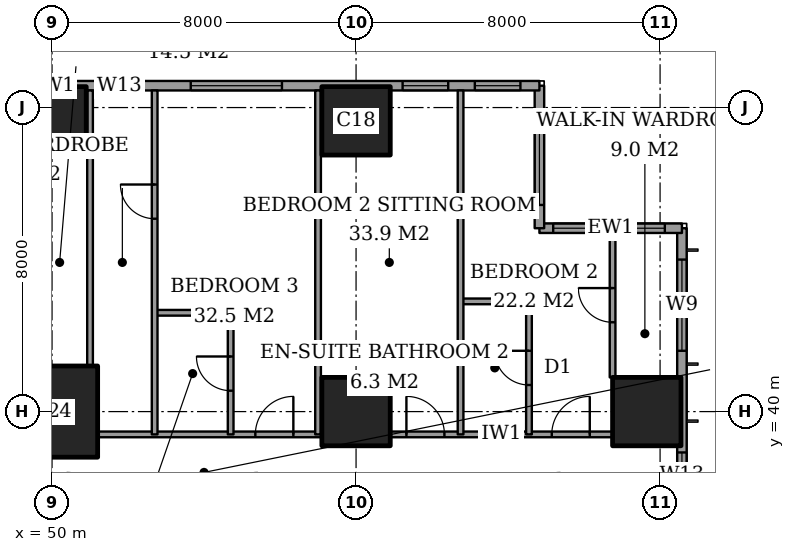
"""IFC4 building model, lengths in metres.
Left out: names, types, materials, properties, quantities, classifications, styles, units other than length and angle.
Written with IfcOpenShell. Run it as: python <this file> out.ifc"""

import sys

from ifc_helpers import new_model, si_unit, direction, frame, frame_2d, origin, origin_2d, place, context, subcontext, project, spatial, rectangle, extrude, element, fill, save


model = new_model("IFC4")
c1 = context("Model", 3, precision=1e-05, world=origin(), true_north=direction((0.0, 1.0)))
c2 = subcontext(c1, "Body", "Model", "MODEL_VIEW")
j1 = project(units=[si_unit("LENGTHUNIT", "METRE"), si_unit("PLANEANGLEUNIT", "RADIAN")], contexts=[c1])
p1 = place(None, origin())
s1 = spatial("IfcSite", under=j1, at=p1, CompositionType="ELEMENT")
p2 = place(p1, origin())
s2 = spatial("IfcBuilding", under=s1, at=p2, CompositionType="ELEMENT")
p3 = place(p2, frame((0.0, 0.0, 196.6)))
s3 = spatial("IfcBuildingStorey", under=s2, at=p3, CompositionType="ELEMENT", Elevation=196.6)
p4 = place(p3, frame((50.0, 40.0, 0.0), z_axis=(0.0, 0.0, 1.0), x_axis=(1.0, 0.0, 0.0)))
e1 = element("IfcColumn", 1, at=p4, inside=s3, PredefinedType="COLUMN", context=c2, shape_type="SweptSolid", body=[
    extrude(rectangle(XDim=2.4, YDim=2.4, at=origin_2d()), origin(), (0.0, 0.0, 1.0), 3.6),
])
for number, where, z_axis, x_axis in (
    (2, (50.0, 47.65, 0.0), (0.0, 0.0, 1.0), (1.0, 0.0, 0.0)),
    (3, (58.0, 40.0, 0.0), (0.0, 0.0, 1.0), (1.0, 0.0, 0.0)),
    (4, (58.0, 47.65, 0.0), (0.0, 0.0, 1.0), (1.0, 0.0, 0.0)),
    (5, (65.65, 40.0, 0.0), (0.0, 0.0, 1.0), (1.0, 0.0, 0.0)),
):
    element("IfcColumn", number, at=place(p3, frame(where, z_axis=z_axis, x_axis=x_axis)), inside=s3, PredefinedType="COLUMN", context=c2, shape_type="SweptSolid", body=[
        extrude(rectangle(XDim=1.8, YDim=1.8, at=origin_2d()), origin(), (0.0, 0.0, 1.0), 3.6),
    ])
p5 = place(p3, frame((66.575, 3.175, 0.0), z_axis=(0.0, 0.0, 1.0), x_axis=(0.0, 1.0, 0.0)))
e6 = element("IfcWall", 6, at=p5, inside=s3, PredefinedType="SOLIDWALL", context=c2, shape_type="SweptSolid", body=[
    extrude(rectangle(XDim=41.65, YDim=0.25, at=frame_2d((20.825, 0.0))), origin(), (0.0, 0.0, 1.0), 3.6),
])
p6 = place(p5, frame((0.825, 0.0, 0.2)))
e7 = element("IfcOpeningElement", 7, at=p6, cuts=e6, PredefinedType="OPENING", context=c2, shape_type="SweptSolid", body=[
    extrude(rectangle(XDim=2.4, YDim=2.4, at=frame_2d((1.2, 1.2))), frame((0.0, 0.135, 0.0), z_axis=(0.0, -1.0, 0.0), x_axis=(1.0, 0.0, 0.0)), (0.0, 0.0, 1.0), 0.27),
])
p7 = place(p5, frame((6.05, 0.0, 0.2)))
e8 = element("IfcOpeningElement", 8, at=p7, cuts=e6, PredefinedType="OPENING", context=c2, shape_type="SweptSolid", body=[
    extrude(rectangle(XDim=1.2, YDim=2.4, at=frame_2d((0.6, 1.2))), frame((0.0, 0.135, 0.0), z_axis=(0.0, -1.0, 0.0), x_axis=(1.0, 0.0, 0.0)), (0.0, 0.0, 1.0), 0.27),
])
p8 = place(p5, frame((8.475, 0.0, 0.2)))
e9 = element("IfcOpeningElement", 9, at=p8, cuts=e6, PredefinedType="OPENING", context=c2, shape_type="SweptSolid", body=[
    extrude(rectangle(XDim=2.4, YDim=2.4, at=frame_2d((1.2, 1.2))), frame((0.0, 0.135, 0.0), z_axis=(0.0, -1.0, 0.0), x_axis=(1.0, 0.0, 0.0)), (0.0, 0.0, 1.0), 0.27),
])
p9 = place(p5, frame((15.675, 0.0, 0.2)))
e10 = element("IfcOpeningElement", 10, at=p9, cuts=e6, PredefinedType="OPENING", context=c2, shape_type="SweptSolid", body=[
    extrude(rectangle(XDim=2.4, YDim=2.4, at=frame_2d((1.2, 1.2))), frame((0.0, 0.135, 0.0), z_axis=(0.0, -1.0, 0.0), x_axis=(1.0, 0.0, 0.0)), (0.0, 0.0, 1.0), 0.27),
])
p10 = place(p5, frame((23.625, 0.0, 0.2)))
e11 = element("IfcOpeningElement", 11, at=p10, cuts=e6, PredefinedType="OPENING", context=c2, shape_type="SweptSolid", body=[
    extrude(rectangle(XDim=2.4, YDim=2.4, at=frame_2d((1.2, 1.2))), frame((0.0, 0.135, 0.0), z_axis=(0.0, -1.0, 0.0), x_axis=(1.0, 0.0, 0.0)), (0.0, 0.0, 1.0), 0.27),
])
p11 = place(p5, frame((30.775, 0.0, 0.2)))
e12 = element("IfcOpeningElement", 12, at=p11, cuts=e6, PredefinedType="OPENING", context=c2, shape_type="SweptSolid", body=[
    extrude(rectangle(XDim=2.4, YDim=2.4, at=frame_2d((1.2, 1.2))), frame((0.0, 0.135, 0.0), z_axis=(0.0, -1.0, 0.0), x_axis=(1.0, 0.0, 0.0)), (0.0, 0.0, 1.0), 0.27),
])
p12 = place(p5, frame((34.55, 0.0, 0.2)))
e13 = element("IfcOpeningElement", 13, at=p12, cuts=e6, PredefinedType="OPENING", context=c2, shape_type="SweptSolid", body=[
    extrude(rectangle(XDim=1.2, YDim=2.4, at=frame_2d((0.6, 1.2))), frame((0.0, 0.135, 0.0), z_axis=(0.0, -1.0, 0.0), x_axis=(1.0, 0.0, 0.0)), (0.0, 0.0, 1.0), 0.27),
])
p13 = place(p5, frame((38.425, 0.0, 0.2)))
e14 = element("IfcOpeningElement", 14, at=p13, cuts=e6, PredefinedType="OPENING", context=c2, shape_type="SweptSolid", body=[
    extrude(rectangle(XDim=2.4, YDim=2.4, at=frame_2d((1.2, 1.2))), frame((0.0, 0.135, 0.0), z_axis=(0.0, -1.0, 0.0), x_axis=(1.0, 0.0, 0.0)), (0.0, 0.0, 1.0), 0.27),
])
p14 = place(p3, frame((66.575, 44.825, 0.0), z_axis=(0.0, 0.0, 1.0), x_axis=(-1.0, 0.0, 0.0)))
e15 = element("IfcWall", 15, at=p14, inside=s3, PredefinedType="SOLIDWALL", context=c2, shape_type="SweptSolid", body=[
    extrude(rectangle(XDim=3.75, YDim=0.25, at=frame_2d((1.875, 0.0))), origin(), (0.0, 0.0, 1.0), 3.6),
])
p15 = place(p14, frame((0.45, 0.0, 0.2)))
e16 = element("IfcOpeningElement", 16, at=p15, cuts=e15, PredefinedType="OPENING", context=c2, shape_type="SweptSolid", body=[
    extrude(rectangle(XDim=1.2, YDim=2.4, at=frame_2d((0.6, 1.2))), frame((0.0, 0.135, 0.0), z_axis=(0.0, -1.0, 0.0), x_axis=(1.0, 0.0, 0.0)), (0.0, 0.0, 1.0), 0.27),
])
p16 = place(p14, frame((2.188, 0.0, 0.2)))
e17 = element("IfcOpeningElement", 17, at=p16, cuts=e15, PredefinedType="OPENING", context=c2, shape_type="SweptSolid", body=[
    extrude(rectangle(XDim=1.2, YDim=2.4, at=frame_2d((0.6, 1.2))), frame((0.0, 0.135, 0.0), z_axis=(0.0, -1.0, 0.0), x_axis=(1.0, 0.0, 0.0)), (0.0, 0.0, 1.0), 0.27),
])
p17 = place(p3, frame((62.825, 44.825, 0.0), z_axis=(0.0, 0.0, 1.0), x_axis=(0.0, 1.0, 0.0)))
e18 = element("IfcWall", 18, at=p17, inside=s3, PredefinedType="SOLIDWALL", context=c2, shape_type="SweptSolid", body=[
    extrude(rectangle(XDim=3.75, YDim=0.25, at=frame_2d((1.875, 0.0))), origin(), (0.0, 0.0, 1.0), 3.6),
])
p18 = place(p17, frame((0.613, 0.0, 0.2)))
e19 = element("IfcOpeningElement", 19, at=p18, cuts=e18, PredefinedType="OPENING", context=c2, shape_type="SweptSolid", body=[
    extrude(rectangle(XDim=2.4, YDim=2.4, at=frame_2d((1.2, 1.2))), frame((0.0, 0.135, 0.0), z_axis=(0.0, -1.0, 0.0), x_axis=(1.0, 0.0, 0.0)), (0.0, 0.0, 1.0), 0.27),
])
p19 = place(p3, frame((62.825, 48.575, 0.0), z_axis=(0.0, 0.0, 1.0), x_axis=(-1.0, 0.0, 0.0)))
e20 = element("IfcWall", 20, at=p19, inside=s3, PredefinedType="SOLIDWALL", context=c2, shape_type="SweptSolid", body=[
    extrude(rectangle(XDim=21.4, YDim=0.25, at=frame_2d((10.7, 0.0))), origin(), (0.0, 0.0, 1.0), 3.6),
])
p20 = place(p19, frame((0.5, 0.0, 0.2)))
e21 = element("IfcOpeningElement", 21, at=p20, cuts=e20, PredefinedType="OPENING", context=c2, shape_type="SweptSolid", body=[
    extrude(rectangle(XDim=1.2, YDim=2.4, at=frame_2d((0.6, 1.2))), frame((0.0, 0.135, 0.0), z_axis=(0.0, -1.0, 0.0), x_axis=(1.0, 0.0, 0.0)), (0.0, 0.0, 1.0), 0.27),
])
p21 = place(p19, frame((2.4, 0.0, 0.2)))
e22 = element("IfcOpeningElement", 22, at=p21, cuts=e20, PredefinedType="OPENING", context=c2, shape_type="SweptSolid", body=[
    extrude(rectangle(XDim=1.2, YDim=2.4, at=frame_2d((0.6, 1.2))), frame((0.0, 0.135, 0.0), z_axis=(0.0, -1.0, 0.0), x_axis=(1.0, 0.0, 0.0)), (0.0, 0.0, 1.0), 0.27),
])
p22 = place(p19, frame((6.775, 0.0, 0.2)))
e23 = element("IfcOpeningElement", 23, at=p22, cuts=e20, PredefinedType="OPENING", context=c2, shape_type="SweptSolid", body=[
    extrude(rectangle(XDim=2.4, YDim=2.4, at=frame_2d((1.2, 1.2))), frame((0.0, 0.135, 0.0), z_axis=(0.0, -1.0, 0.0), x_axis=(1.0, 0.0, 0.0)), (0.0, 0.0, 1.0), 0.27),
])
p23 = place(p19, frame((10.45, 0.0, 0.2)))
e24 = element("IfcOpeningElement", 24, at=p23, cuts=e20, PredefinedType="OPENING", context=c2, shape_type="SweptSolid", body=[
    extrude(rectangle(XDim=1.2, YDim=2.4, at=frame_2d((0.6, 1.2))), frame((0.0, 0.135, 0.0), z_axis=(0.0, -1.0, 0.0), x_axis=(1.0, 0.0, 0.0)), (0.0, 0.0, 1.0), 0.27),
])
p24 = place(p19, frame((14.425, 0.0, 0.2)))
e25 = element("IfcOpeningElement", 25, at=p24, cuts=e20, PredefinedType="OPENING", context=c2, shape_type="SweptSolid", body=[
    extrude(rectangle(XDim=2.4, YDim=2.4, at=frame_2d((1.2, 1.2))), frame((0.0, 0.135, 0.0), z_axis=(0.0, -1.0, 0.0), x_axis=(1.0, 0.0, 0.0)), (0.0, 0.0, 1.0), 0.27),
])
p25 = place(p19, frame((17.9, 0.0, 0.2)))
e26 = element("IfcOpeningElement", 26, at=p25, cuts=e20, PredefinedType="OPENING", context=c2, shape_type="SweptSolid", body=[
    extrude(rectangle(XDim=1.2, YDim=2.4, at=frame_2d((0.6, 1.2))), frame((0.0, 0.135, 0.0), z_axis=(0.0, -1.0, 0.0), x_axis=(1.0, 0.0, 0.0)), (0.0, 0.0, 1.0), 0.27),
])
p26 = place(p3, frame((51.2, 39.4, 0.0), z_axis=(0.0, 0.0, 1.0), x_axis=(1.0, 0.0, 0.0)))
e27 = element("IfcWall", 27, at=p26, inside=s3, PredefinedType="PARTITIONING", context=c2, shape_type="SweptSolid", body=[
    extrude(rectangle(XDim=5.9, YDim=0.15, at=frame_2d((2.95, 0.0))), origin(), (0.0, 0.0, 1.0), 3.35),
])
p27 = place(p26, frame((4.15, 0.0, 0.0)))
e28 = element("IfcOpeningElement", 28, at=p27, cuts=e27, PredefinedType="OPENING", context=c2, shape_type="SweptSolid", body=[
    extrude(rectangle(XDim=1.0, YDim=2.1, at=frame_2d((0.5, 1.05))), frame((0.0, 0.085, 0.0), z_axis=(0.0, -1.0, 0.0), x_axis=(1.0, 0.0, 0.0)), (0.0, 0.0, 1.0), 0.17),
])
p28 = place(p3, frame((58.9, 39.4, 0.0), z_axis=(0.0, 0.0, 1.0), x_axis=(1.0, 0.0, 0.0)))
e29 = element("IfcWall", 29, at=p28, inside=s3, PredefinedType="PARTITIONING", context=c2, shape_type="SweptSolid", body=[
    extrude(rectangle(XDim=5.85, YDim=0.15, at=frame_2d((2.925, 0.0))), origin(), (0.0, 0.0, 1.0), 3.35),
])
p29 = place(p28, frame((4.25, 0.0, 0.0)))
e30 = element("IfcOpeningElement", 30, at=p29, cuts=e29, PredefinedType="OPENING", context=c2, shape_type="SweptSolid", body=[
    extrude(rectangle(XDim=1.0, YDim=2.1, at=frame_2d((0.5, 1.05))), frame((0.0, 0.085, 0.0), z_axis=(0.0, -1.0, 0.0), x_axis=(1.0, 0.0, 0.0)), (0.0, 0.0, 1.0), 0.17),
])
p30 = place(p28, frame((0.425, 0.0, 0.0)))
e31 = element("IfcOpeningElement", 31, at=p30, cuts=e29, PredefinedType="OPENING", context=c2, shape_type="SweptSolid", body=[
    extrude(rectangle(XDim=1.0, YDim=2.1, at=frame_2d((0.5, 1.05))), frame((0.0, 0.085, 0.0), z_axis=(0.0, -1.0, 0.0), x_axis=(1.0, 0.0, 0.0)), (0.0, 0.0, 1.0), 0.17),
])
p31 = place(p3, frame((52.7, 42.6, 0.0), z_axis=(0.0, 0.0, 1.0), x_axis=(1.0, 0.0, 0.0)))
e32 = element("IfcWall", 32, at=p31, inside=s3, PredefinedType="PARTITIONING", context=c2, shape_type="SweptSolid", body=[
    extrude(rectangle(XDim=2.0, YDim=0.15, at=frame_2d((1.0, 0.0))), origin(), (0.0, 0.0, 1.0), 3.35),
])
p32 = place(p3, frame((60.75, 42.9, 0.0), z_axis=(0.0, 0.0, 1.0), x_axis=(1.0, 0.0, 0.0)))
e33 = element("IfcWall", 33, at=p32, inside=s3, PredefinedType="PARTITIONING", context=c2, shape_type="SweptSolid", body=[
    extrude(rectangle(XDim=1.8, YDim=0.15, at=frame_2d((0.9, 0.0))), origin(), (0.0, 0.0, 1.0), 3.35),
])
p33 = place(p3, frame((51.0, 41.2, 0.0), z_axis=(0.0, 0.0, 1.0), x_axis=(0.0, 1.0, 0.0)))
e34 = element("IfcWall", 34, at=p33, inside=s3, PredefinedType="PARTITIONING", context=c2, shape_type="SweptSolid", body=[
    extrude(rectangle(XDim=7.25, YDim=0.15, at=frame_2d((3.625, 0.0))), origin(), (0.0, 0.0, 1.0), 3.35),
])
p34 = place(p3, frame((52.7, 39.4, 0.0), z_axis=(0.0, 0.0, 1.0), x_axis=(0.0, 1.0, 0.0)))
e35 = element("IfcWall", 35, at=p34, inside=s3, PredefinedType="PARTITIONING", context=c2, shape_type="SweptSolid", body=[
    extrude(rectangle(XDim=9.05, YDim=0.15, at=frame_2d((4.525, 0.0))), origin(), (0.0, 0.0, 1.0), 3.35),
])
p35 = place(p34, frame((5.675, 0.0, 0.0)))
e36 = element("IfcOpeningElement", 36, at=p35, cuts=e35, PredefinedType="OPENING", context=c2, shape_type="SweptSolid", body=[
    extrude(rectangle(XDim=0.9, YDim=2.1, at=frame_2d((0.45, 1.05))), frame((0.0, 0.085, 0.0), z_axis=(0.0, -1.0, 0.0), x_axis=(1.0, 0.0, 0.0)), (0.0, 0.0, 1.0), 0.17),
])
p36 = place(p3, frame((54.7, 39.4, 0.0), z_axis=(0.0, 0.0, 1.0), x_axis=(0.0, 1.0, 0.0)))
e37 = element("IfcWall", 37, at=p36, inside=s3, PredefinedType="PARTITIONING", context=c2, shape_type="SweptSolid", body=[
    extrude(rectangle(XDim=3.2, YDim=0.15, at=frame_2d((1.6, 0.0))), origin(), (0.0, 0.0, 1.0), 3.35),
])
p37 = place(p36, frame((1.15, 0.0, 0.0)))
e38 = element("IfcOpeningElement", 38, at=p37, cuts=e37, PredefinedType="OPENING", context=c2, shape_type="SweptSolid", body=[
    extrude(rectangle(XDim=0.9, YDim=2.1, at=frame_2d((0.45, 1.05))), frame((0.0, 0.085, 0.0), z_axis=(0.0, -1.0, 0.0), x_axis=(1.0, 0.0, 0.0)), (0.0, 0.0, 1.0), 0.17),
])
for number, where, z_axis, x_axis in (
    (39, (57.0, 39.4, 0.0), (0.0, 0.0, 1.0), (0.0, 1.0, 0.0)),
    (40, (60.75, 39.4, 0.0), (0.0, 0.0, 1.0), (0.0, 1.0, 0.0)),
):
    element("IfcWall", number, at=place(p3, frame(where, z_axis=z_axis, x_axis=x_axis)), inside=s3, PredefinedType="PARTITIONING", context=c2, shape_type="SweptSolid", body=[
        extrude(rectangle(XDim=9.05, YDim=0.15, at=frame_2d((4.525, 0.0))), origin(), (0.0, 0.0, 1.0), 3.35),
    ])
p38 = place(p3, frame((62.55, 39.4, 0.0), z_axis=(0.0, 0.0, 1.0), x_axis=(0.0, 1.0, 0.0)))
e41 = element("IfcWall", 41, at=p38, inside=s3, PredefinedType="PARTITIONING", context=c2, shape_type="SweptSolid", body=[
    extrude(rectangle(XDim=3.5, YDim=0.15, at=frame_2d((1.75, 0.0))), origin(), (0.0, 0.0, 1.0), 3.35),
])
p39 = place(p38, frame((1.3, 0.0, 0.0)))
e42 = element("IfcOpeningElement", 42, at=p39, cuts=e41, PredefinedType="OPENING", context=c2, shape_type="SweptSolid", body=[
    extrude(rectangle(XDim=0.9, YDim=2.1, at=frame_2d((0.45, 1.05))), frame((0.0, 0.085, 0.0), z_axis=(0.0, -1.0, 0.0), x_axis=(1.0, 0.0, 0.0)), (0.0, 0.0, 1.0), 0.17),
])
p40 = place(p3, frame((64.75, 40.9, 0.0), z_axis=(0.0, 0.0, 1.0), x_axis=(0.0, 1.0, 0.0)))
e43 = element("IfcWall", 43, at=p40, inside=s3, PredefinedType="PARTITIONING", context=c2, shape_type="SweptSolid", body=[
    extrude(rectangle(XDim=3.8, YDim=0.15, at=frame_2d((1.9, 0.0))), origin(), (0.0, 0.0, 1.0), 3.35),
])
p41 = place(p40, frame((1.45, 0.0, 0.0)))
e44 = element("IfcOpeningElement", 44, at=p41, cuts=e43, PredefinedType="OPENING", context=c2, shape_type="SweptSolid", body=[
    extrude(rectangle(XDim=0.9, YDim=2.1, at=frame_2d((0.45, 1.05))), frame((0.0, 0.085, 0.0), z_axis=(0.0, -1.0, 0.0), x_axis=(1.0, 0.0, 0.0)), (0.0, 0.0, 1.0), 0.17),
])
p42 = place(p12, origin())
e45 = element("IfcWindow", 45, at=p42, inside=s3, PartitioningType="SINGLE_PANEL", PredefinedType="WINDOW", context=c2, shape_type="SweptSolid", body=[
    extrude(rectangle(XDim=1.2, YDim=2.4, at=frame_2d((0.6, 1.2))), frame((0.0, 0.03, 0.0), z_axis=(0.0, -1.0, 0.0), x_axis=(1.0, 0.0, 0.0)), (0.0, 0.0, 1.0), 0.06),
])
fill(e13, e45)
p43 = place(p13, origin())
e46 = element("IfcWindow", 46, at=p43, inside=s3, PartitioningType="SINGLE_PANEL", PredefinedType="WINDOW", context=c2, shape_type="SweptSolid", body=[
    extrude(rectangle(XDim=2.4, YDim=2.4, at=frame_2d((1.2, 1.2))), frame((0.0, 0.03, 0.0), z_axis=(0.0, -1.0, 0.0), x_axis=(1.0, 0.0, 0.0)), (0.0, 0.0, 1.0), 0.06),
])
fill(e14, e46)
p44 = place(p15, origin())
e47 = element("IfcWindow", 47, at=p44, inside=s3, PartitioningType="SINGLE_PANEL", PredefinedType="WINDOW", context=c2, shape_type="SweptSolid", body=[
    extrude(rectangle(XDim=1.2, YDim=2.4, at=frame_2d((0.6, 1.2))), frame((0.0, 0.03, 0.0), z_axis=(0.0, -1.0, 0.0), x_axis=(1.0, 0.0, 0.0)), (0.0, 0.0, 1.0), 0.06),
])
fill(e16, e47)
p45 = place(p16, origin())
e48 = element("IfcWindow", 48, at=p45, inside=s3, PartitioningType="SINGLE_PANEL", PredefinedType="WINDOW", context=c2, shape_type="SweptSolid", body=[
    extrude(rectangle(XDim=1.2, YDim=2.4, at=frame_2d((0.6, 1.2))), frame((0.0, 0.03, 0.0), z_axis=(0.0, -1.0, 0.0), x_axis=(1.0, 0.0, 0.0)), (0.0, 0.0, 1.0), 0.06),
])
fill(e17, e48)
p46 = place(p18, origin())
e49 = element("IfcWindow", 49, at=p46, inside=s3, PartitioningType="SINGLE_PANEL", PredefinedType="WINDOW", context=c2, shape_type="SweptSolid", body=[
    extrude(rectangle(XDim=2.4, YDim=2.4, at=frame_2d((1.2, 1.2))), frame((0.0, 0.03, 0.0), z_axis=(0.0, -1.0, 0.0), x_axis=(1.0, 0.0, 0.0)), (0.0, 0.0, 1.0), 0.06),
])
fill(e19, e49)
p47 = place(p20, origin())
e50 = element("IfcWindow", 50, at=p47, inside=s3, PartitioningType="SINGLE_PANEL", PredefinedType="WINDOW", context=c2, shape_type="SweptSolid", body=[
    extrude(rectangle(XDim=1.2, YDim=2.4, at=frame_2d((0.6, 1.2))), frame((0.0, 0.03, 0.0), z_axis=(0.0, -1.0, 0.0), x_axis=(1.0, 0.0, 0.0)), (0.0, 0.0, 1.0), 0.06),
])
fill(e21, e50)
p48 = place(p21, origin())
e51 = element("IfcWindow", 51, at=p48, inside=s3, PartitioningType="SINGLE_PANEL", PredefinedType="WINDOW", context=c2, shape_type="SweptSolid", body=[
    extrude(rectangle(XDim=1.2, YDim=2.4, at=frame_2d((0.6, 1.2))), frame((0.0, 0.03, 0.0), z_axis=(0.0, -1.0, 0.0), x_axis=(1.0, 0.0, 0.0)), (0.0, 0.0, 1.0), 0.06),
])
fill(e22, e51)
p49 = place(p22, origin())
e52 = element("IfcWindow", 52, at=p49, inside=s3, PartitioningType="SINGLE_PANEL", PredefinedType="WINDOW", context=c2, shape_type="SweptSolid", body=[
    extrude(rectangle(XDim=2.4, YDim=2.4, at=frame_2d((1.2, 1.2))), frame((0.0, 0.03, 0.0), z_axis=(0.0, -1.0, 0.0), x_axis=(1.0, 0.0, 0.0)), (0.0, 0.0, 1.0), 0.06),
])
fill(e23, e52)
p50 = place(p23, origin())
e53 = element("IfcWindow", 53, at=p50, inside=s3, PartitioningType="SINGLE_PANEL", PredefinedType="WINDOW", context=c2, shape_type="SweptSolid", body=[
    extrude(rectangle(XDim=1.2, YDim=2.4, at=frame_2d((0.6, 1.2))), frame((0.0, 0.03, 0.0), z_axis=(0.0, -1.0, 0.0), x_axis=(1.0, 0.0, 0.0)), (0.0, 0.0, 1.0), 0.06),
])
fill(e24, e53)
p51 = place(p41, origin())
e54 = element("IfcDoor", 54, at=p51, inside=s3, OperationType="SINGLE_SWING_LEFT", PredefinedType="DOOR", context=c2, shape_type="SweptSolid", body=[
    extrude(rectangle(XDim=0.9, YDim=2.1, at=frame_2d((0.45, 1.05))), frame((0.0, 0.025, 0.0), z_axis=(0.0, -1.0, 0.0), x_axis=(1.0, 0.0, 0.0)), (0.0, 0.0, 1.0), 0.05),
])
fill(e44, e54)
p52 = place(p39, origin())
e55 = element("IfcDoor", 55, at=p52, inside=s3, OperationType="SINGLE_SWING_LEFT", PredefinedType="DOOR", context=c2, shape_type="SweptSolid", body=[
    extrude(rectangle(XDim=0.9, YDim=2.1, at=frame_2d((0.45, 1.05))), frame((0.0, 0.025, 0.0), z_axis=(0.0, -1.0, 0.0), x_axis=(1.0, 0.0, 0.0)), (0.0, 0.0, 1.0), 0.05),
])
fill(e42, e55)
p53 = place(p29, origin())
e56 = element("IfcDoor", 56, at=p53, inside=s3, OperationType="SINGLE_SWING_LEFT", PredefinedType="DOOR", context=c2, shape_type="SweptSolid", body=[
    extrude(rectangle(XDim=1.0, YDim=2.1, at=frame_2d((0.5, 1.05))), frame((0.0, 0.025, 0.0), z_axis=(0.0, -1.0, 0.0), x_axis=(1.0, 0.0, 0.0)), (0.0, 0.0, 1.0), 0.05),
])
fill(e30, e56)
p54 = place(p30, origin())
e57 = element("IfcDoor", 57, at=p54, inside=s3, OperationType="SINGLE_SWING_RIGHT", PredefinedType="DOOR", context=c2, shape_type="SweptSolid", body=[
    extrude(rectangle(XDim=1.0, YDim=2.1, at=frame_2d((0.5, 1.05))), frame((0.0, 0.025, 0.0), z_axis=(0.0, -1.0, 0.0), x_axis=(1.0, 0.0, 0.0)), (0.0, 0.0, 1.0), 0.05),
])
fill(e31, e57)
p55 = place(p37, origin())
e58 = element("IfcDoor", 58, at=p55, inside=s3, OperationType="SINGLE_SWING_LEFT", PredefinedType="DOOR", context=c2, shape_type="SweptSolid", body=[
    extrude(rectangle(XDim=0.9, YDim=2.1, at=frame_2d((0.45, 1.05))), frame((0.0, 0.025, 0.0), z_axis=(0.0, -1.0, 0.0), x_axis=(1.0, 0.0, 0.0)), (0.0, 0.0, 1.0), 0.05),
])
fill(e38, e58)
p56 = place(p27, origin())
e59 = element("IfcDoor", 59, at=p56, inside=s3, OperationType="SINGLE_SWING_LEFT", PredefinedType="DOOR", context=c2, shape_type="SweptSolid", body=[
    extrude(rectangle(XDim=1.0, YDim=2.1, at=frame_2d((0.5, 1.05))), frame((0.0, 0.025, 0.0), z_axis=(0.0, -1.0, 0.0), x_axis=(1.0, 0.0, 0.0)), (0.0, 0.0, 1.0), 0.05),
])
fill(e28, e59)
p57 = place(p35, origin())
e60 = element("IfcDoor", 60, at=p57, inside=s3, OperationType="SINGLE_SWING_LEFT", PredefinedType="DOOR", context=c2, shape_type="SweptSolid", body=[
    extrude(rectangle(XDim=0.9, YDim=2.1, at=frame_2d((0.45, 1.05))), frame((0.0, 0.025, 0.0), z_axis=(0.0, -1.0, 0.0), x_axis=(1.0, 0.0, 0.0)), (0.0, 0.0, 1.0), 0.05),
])
fill(e36, e60)
save(model, sys.argv[1])
